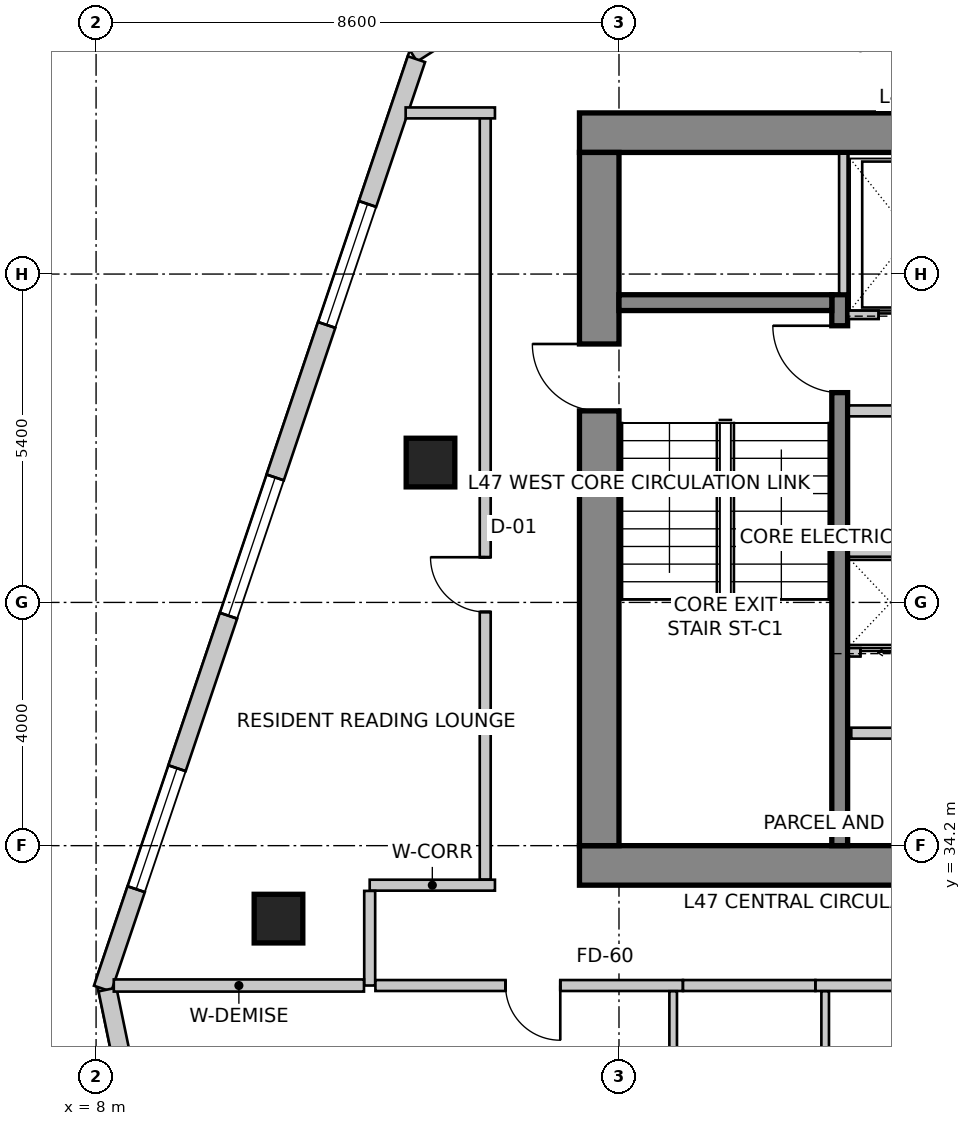
"""IFC4 building model, lengths in metres.
Left out: names, types, materials, properties, quantities, classifications, styles, units other than length and angle.
Written with IfcOpenShell. Run it as: python <this file> out.ifc"""

import sys

from ifc_helpers import new_model, si_unit, direction, frame, frame_2d, origin, origin_2d, place, context, subcontext, project, spatial, rectangle, extrude, source, transform, mapped, element, fill, save


model = new_model("IFC4")
c1 = context("Model", 3, precision=1e-05, world=origin(), true_north=direction((0.0, 1.0)))
c2 = subcontext(c1, "Body", "Model", "MODEL_VIEW")
j1 = project(units=[si_unit("LENGTHUNIT", "METRE"), si_unit("PLANEANGLEUNIT", "RADIAN")], contexts=[c1])
p1 = place(None, origin())
s1 = spatial("IfcSite", under=j1, at=p1, CompositionType="ELEMENT")
p2 = place(p1, origin())
s2 = spatial("IfcBuilding", under=s1, at=p2, CompositionType="ELEMENT")
p3 = place(p2, frame((0.0, 0.0, 190.4)))
s3 = spatial("IfcBuildingStorey", under=s2, at=p3, CompositionType="ELEMENT", Elevation=190.4)
p4 = place(p3, frame((15.95, 45.925, 0.0), z_axis=(0.0, 0.0, 1.0), x_axis=(1.0, 0.0, 0.0)))
e1 = element("IfcWall", 1, at=p4, inside=s3, PredefinedType="SHEAR", context=c2, shape_type="SweptSolid", body=[
    extrude(rectangle(XDim=15.7, YDim=0.65, at=frame_2d((7.85, 0.0))), origin(), (0.0, 0.0, 1.0), 3.5),
])
p5 = place(p3, frame((15.95, 33.875, 0.0), z_axis=(0.0, 0.0, 1.0), x_axis=(1.0, 0.0, 0.0)))
e2 = element("IfcWall", 2, at=p5, inside=s3, PredefinedType="SHEAR", context=c2, shape_type="SweptSolid", body=[
    extrude(rectangle(XDim=15.7, YDim=0.65, at=frame_2d((7.85, 0.0))), origin(), (0.0, 0.0, 1.0), 3.5),
])
m1 = source(origin(), c2, "Body", "SweptSolid", [
    extrude(rectangle(XDim=1.1, YDim=2.15, at=frame_2d((0.55, 1.075))), frame((0.0, 0.335, 0.0), z_axis=(0.0, -1.0, 0.0), x_axis=(1.0, 0.0, 0.0)), (0.0, 0.0, 1.0), 0.67),
])
p6 = place(p5, frame((10.08, 0.0, 0.0)))
e3 = element("IfcOpeningElement", 3, at=p6, cuts=e2, PredefinedType="OPENING", context=c2, shape_type="MappedRepresentation", body=[
    mapped(m1, transform((0.0, 0.0, 0.0), scale=1.0)),
])
p7 = place(p3, frame((16.275, 34.2, 0.0), z_axis=(0.0, 0.0, 1.0), x_axis=(0.0, 1.0, 0.0)))
e4 = element("IfcWall", 4, at=p7, inside=s3, PredefinedType="SHEAR", context=c2, shape_type="SweptSolid", body=[
    extrude(rectangle(XDim=11.4, YDim=0.65, at=frame_2d((5.7, 0.0))), origin(), (0.0, 0.0, 1.0), 3.5),
])
p8 = place(p7, frame((7.15, 0.0, 0.0)))
e5 = element("IfcOpeningElement", 5, at=p8, cuts=e4, PredefinedType="OPENING", context=c2, shape_type="MappedRepresentation", body=[
    mapped(m1, transform((0.0, 0.0, 0.0), scale=1.0)),
])
p9 = place(p3, frame((20.23, 34.2, 0.0), z_axis=(0.0, 0.0, 1.0), x_axis=(0.0, 1.0, 0.0)))
e6 = element("IfcWall", 6, at=p9, inside=s3, PredefinedType="SHEAR", context=c2, shape_type="SweptSolid", body=[
    extrude(rectangle(XDim=9.06, YDim=0.26, at=frame_2d((4.53, 0.0))), origin(), (0.0, 0.0, 1.0), 3.5),
])
m2 = source(origin(), c2, "Body", "SweptSolid", [
    extrude(rectangle(XDim=1.1, YDim=2.15, at=frame_2d((0.55, 1.075))), frame((0.0, 0.14, 0.0), z_axis=(0.0, -1.0, 0.0), x_axis=(1.0, 0.0, 0.0)), (0.0, 0.0, 1.0), 0.28),
])
p10 = place(p9, frame((7.45, 0.0, 0.0)))
e7 = element("IfcOpeningElement", 7, at=p10, cuts=e6, PredefinedType="OPENING", context=c2, shape_type="MappedRepresentation", body=[
    mapped(m2, transform((0.0, 0.0, 0.0), scale=1.0)),
])
p11 = place(p3, frame((16.6, 43.13, 0.0), z_axis=(0.0, 0.0, 1.0), x_axis=(1.0, 0.0, 0.0)))
e8 = element("IfcWall", 8, at=p11, inside=s3, PredefinedType="SHEAR", context=c2, shape_type="SweptSolid", body=[
    extrude(rectangle(XDim=3.5, YDim=0.26, at=frame_2d((1.75, 0.0))), origin(), (0.0, 0.0, 1.0), 3.5),
])
m3 = source(origin(), c2, "Body", "SweptSolid", [
    extrude(rectangle(XDim=0.8, YDim=0.8, at=origin_2d()), origin(), (0.0, 0.0, 1.0), 3.5),
])
for number, where, z_axis, x_axis in (
    (9, (11.0, 33.0, 0.0), (0.0, 0.0, 1.0), (1.0, 0.0, 0.0)),
    (10, (13.5, 40.5, 0.0), (0.0, 0.0, 1.0), (1.0, 0.0, 0.0)),
):
    element("IfcColumn", number, at=place(p3, frame(where, z_axis=z_axis, x_axis=x_axis)), inside=s3, PredefinedType="COLUMN", context=c2, shape_type="MappedRepresentation", body=[
        mapped(m3, transform((0.0, 0.0, 0.0), scale=1.0)),
    ])
p12 = place(p3, frame((21.875, 52.742, 0.0), z_axis=(0.0, 0.0, 1.0), x_axis=(-0.843666375448, -0.536867811419, 0.0)))
e11 = element("IfcWall", 11, at=p12, inside=s3, PredefinedType="SOLIDWALL", context=c2, shape_type="SweptSolid", body=[
    extrude(rectangle(XDim=10.284, YDim=0.3, at=frame_2d((5.142, 0.0))), origin(), (0.0, 0.0, 1.0), 3.25),
])
m4 = source(origin(), c2, "Body", "SweptSolid", [
    extrude(rectangle(XDim=2.4, YDim=2.2, at=frame_2d((1.2, 1.1))), frame((0.0, 0.16, 0.0), z_axis=(0.0, -1.0, 0.0), x_axis=(1.0, 0.0, 0.0)), (0.0, 0.0, 1.0), 0.32),
])
p13 = place(p12, frame((3.307, 0.0, 0.85)))
e12 = element("IfcOpeningElement", 12, at=p13, cuts=e11, PredefinedType="OPENING", context=c2, shape_type="MappedRepresentation", body=[
    mapped(m4, transform((0.0, 0.0, 0.0), scale=1.0)),
])
p14 = place(p3, frame((13.269, 47.134, 0.0), z_axis=(0.0, 0.0, 1.0), x_axis=(-0.319920776449, -0.947444297464, 0.0)))
e13 = element("IfcWall", 13, at=p14, inside=s3, PredefinedType="SOLIDWALL", context=c2, shape_type="SweptSolid", body=[
    extrude(rectangle(XDim=16.133, YDim=0.3, at=frame_2d((8.067, 0.0))), origin(), (0.0, 0.0, 1.0), 3.25),
])
m5 = source(origin(), c2, "Body", "SweptSolid", [
    extrude(rectangle(XDim=2.1, YDim=2.0, at=frame_2d((1.05, 1.0))), frame((0.0, 0.16, 0.0), z_axis=(0.0, -1.0, 0.0), x_axis=(1.0, 0.0, 0.0)), (0.0, 0.0, 1.0), 0.32),
])
p15 = place(p14, frame((2.513, 0.0, 0.85)))
e14 = element("IfcOpeningElement", 14, at=p15, cuts=e13, PredefinedType="OPENING", context=c2, shape_type="MappedRepresentation", body=[
    mapped(m5, transform((0.0, 0.0, 0.0), scale=1.0)),
])
p16 = place(p14, frame((7.26, 0.0, 0.85)))
e15 = element("IfcOpeningElement", 15, at=p16, cuts=e13, PredefinedType="OPENING", context=c2, shape_type="MappedRepresentation", body=[
    mapped(m4, transform((0.0, 0.0, 0.0), scale=1.0)),
])
p17 = place(p14, frame((12.307, 0.0, 0.85)))
e16 = element("IfcOpeningElement", 16, at=p17, cuts=e13, PredefinedType="OPENING", context=c2, shape_type="MappedRepresentation", body=[
    mapped(m5, transform((0.0, 0.0, 0.0), scale=1.0)),
])
p18 = place(p3, frame((8.188, 31.834, 0.0), z_axis=(0.0, 0.0, 1.0), x_axis=(0.202303475707, -0.979322880217, 0.0)))
e17 = element("IfcWall", 17, at=p18, inside=s3, PredefinedType="SOLIDWALL", context=c2, shape_type="SweptSolid", body=[
    extrude(rectangle(XDim=15.766, YDim=0.3, at=frame_2d((7.883, 0.0))), origin(), (0.0, 0.0, 1.0), 3.25),
])
p19 = place(p18, frame((1.404, 0.0, 0.85)))
e18 = element("IfcOpeningElement", 18, at=p19, cuts=e17, PredefinedType="OPENING", context=c2, shape_type="MappedRepresentation", body=[
    mapped(m4, transform((0.0, 0.0, 0.0), scale=1.0)),
])
p20 = place(p18, frame((6.121, 0.0, 0.85)))
e19 = element("IfcOpeningElement", 19, at=p20, cuts=e17, PredefinedType="OPENING", context=c2, shape_type="MappedRepresentation", body=[
    mapped(m5, transform((0.0, 0.0, 0.0), scale=1.0)),
])
p21 = place(p18, frame((11.47, 0.0, 0.85)))
e20 = element("IfcOpeningElement", 20, at=p21, cuts=e17, PredefinedType="OPENING", context=c2, shape_type="MappedRepresentation", body=[
    mapped(m4, transform((0.0, 0.0, 0.0), scale=1.0)),
])
p22 = place(p3, frame((20.37, 42.93, 0.0), z_axis=(0.0, 0.0, 1.0), x_axis=(1.0, 0.0, 0.0)))
e21 = element("IfcWall", 21, at=p22, inside=s3, PredefinedType="SOLIDWALL", context=c2, shape_type="SweptSolid", body=[
    extrude(rectangle(XDim=6.86, YDim=0.14, at=frame_2d((3.43, 0.0))), origin(), (0.0, 0.0, 1.0), 3.25),
])
m6 = source(origin(), c2, "Body", "SweptSolid", [
    extrude(rectangle(XDim=1.1, YDim=2.15, at=frame_2d((0.55, 1.075))), frame((0.0, 0.08, 0.0), z_axis=(0.0, -1.0, 0.0), x_axis=(1.0, 0.0, 0.0)), (0.0, 0.0, 1.0), 0.16),
])
p23 = place(p22, frame((0.5, 0.0, 0.0)))
e22 = element("IfcOpeningElement", 22, at=p23, cuts=e21, PredefinedType="OPENING", context=c2, shape_type="MappedRepresentation", body=[
    mapped(m6, transform((0.0, 0.0, 0.0), scale=1.0)),
])
p24 = place(p22, frame((2.7, 0.0, 0.0)))
e23 = element("IfcOpeningElement", 23, at=p24, cuts=e21, PredefinedType="OPENING", context=c2, shape_type="MappedRepresentation", body=[
    mapped(m6, transform((0.0, 0.0, 0.0), scale=1.0)),
])
p25 = place(p22, frame((5.1, 0.0, 0.0)))
e24 = element("IfcOpeningElement", 24, at=p25, cuts=e21, PredefinedType="OPENING", context=c2, shape_type="MappedRepresentation", body=[
    mapped(m6, transform((0.0, 0.0, 0.0), scale=1.0)),
])
p26 = place(p3, frame((20.29, 43.28, 0.0), z_axis=(0.0, 0.0, 1.0), x_axis=(0.0, 1.0, 0.0)))
e25 = element("IfcWall", 25, at=p26, inside=s3, PredefinedType="SOLIDWALL", context=c2, shape_type="SweptSolid", body=[
    extrude(rectangle(XDim=2.3, YDim=0.14, at=frame_2d((1.15, 0.0))), origin(), (0.0, 0.0, 1.0), 3.25),
])
p27 = place(p3, frame((20.38, 37.38, 0.0), z_axis=(0.0, 0.0, 1.0), x_axis=(1.0, 0.0, 0.0)))
e26 = element("IfcWall", 26, at=p27, inside=s3, PredefinedType="SOLIDWALL", context=c2, shape_type="SweptSolid", body=[
    extrude(rectangle(XDim=5.75, YDim=0.14, at=frame_2d((2.875, 0.0))), origin(), (0.0, 0.0, 1.0), 3.25),
])
m7 = source(origin(), c2, "Body", "SweptSolid", [
    extrude(rectangle(XDim=1.0, YDim=2.15, at=frame_2d((0.5, 1.075))), frame((0.0, 0.08, 0.0), z_axis=(0.0, -1.0, 0.0), x_axis=(1.0, 0.0, 0.0)), (0.0, 0.0, 1.0), 0.16),
])
p28 = place(p27, frame((0.19, 0.0, 0.0)))
e27 = element("IfcOpeningElement", 27, at=p28, cuts=e26, PredefinedType="OPENING", context=c2, shape_type="MappedRepresentation", body=[
    mapped(m7, transform((0.0, 0.0, 0.0), scale=1.0)),
])
p29 = place(p3, frame((20.38, 39.04, 0.0), z_axis=(0.0, 0.0, 1.0), x_axis=(1.0, 0.0, 0.0)))
e28 = element("IfcWall", 28, at=p29, inside=s3, PredefinedType="SOLIDWALL", context=c2, shape_type="SweptSolid", body=[
    extrude(rectangle(XDim=5.75, YDim=0.18, at=frame_2d((2.875, 0.0))), origin(), (0.0, 0.0, 1.0), 3.25),
])
p30 = place(p3, frame((22.96, 41.35, 0.0), z_axis=(0.0, 0.0, 1.0), x_axis=(-1.0, 0.0, 0.0)))
e29 = element("IfcWall", 29, at=p30, inside=s3, PredefinedType="PARTITIONING", context=c2, shape_type="SweptSolid", body=[
    extrude(rectangle(XDim=2.58, YDim=0.18, at=frame_2d((1.29, 0.0))), origin(), (0.0, 0.0, 1.0), 3.25),
])
p31 = place(p3, frame((20.42, 36.05, 0.0), z_axis=(0.0, 0.0, 1.0), x_axis=(1.0, 0.0, 0.0)))
e30 = element("IfcWall", 30, at=p31, inside=s3, PredefinedType="PARTITIONING", context=c2, shape_type="SweptSolid", body=[
    extrude(rectangle(XDim=5.46, YDim=0.18, at=frame_2d((2.73, 0.0))), origin(), (0.0, 0.0, 1.0), 3.25),
])
m8 = source(origin(), c2, "Body", "SweptSolid", [
    extrude(rectangle(XDim=0.9, YDim=2.15, at=frame_2d((0.45, 1.075))), frame((0.0, 0.1, 0.0), z_axis=(0.0, -1.0, 0.0), x_axis=(1.0, 0.0, 0.0)), (0.0, 0.0, 1.0), 0.2),
])
p32 = place(p31, frame((2.219, 0.0, 0.0)))
e31 = element("IfcOpeningElement", 31, at=p32, cuts=e30, PredefinedType="OPENING", context=c2, shape_type="MappedRepresentation", body=[
    mapped(m8, transform((0.0, 0.0, 0.0), scale=1.0)),
])
p33 = place(p3, frame((12.5, 33.55, 0.0), z_axis=(0.0, 0.0, 1.0), x_axis=(1.0, 0.0, 0.0)))
e32 = element("IfcWall", 32, at=p33, inside=s3, PredefinedType="PARTITIONING", context=c2, shape_type="SweptSolid", body=[
    extrude(rectangle(XDim=2.06, YDim=0.18, at=frame_2d((1.03, 0.0))), origin(), (0.0, 0.0, 1.0), 3.25),
])
p34 = place(p3, frame((12.5, 31.9, 0.0), z_axis=(0.0, 0.0, 1.0), x_axis=(0.0, 1.0, 0.0)))
e33 = element("IfcWall", 33, at=p34, inside=s3, PredefinedType="PARTITIONING", context=c2, shape_type="SweptSolid", body=[
    extrude(rectangle(XDim=1.556, YDim=0.18, at=frame_2d((0.778, 0.0))), origin(), (0.0, 0.0, 1.0), 2.934),
])
p35 = place(p3, frame((23.751, 31.9, 0.0), z_axis=(0.0, 0.0, 1.0), x_axis=(-1.0, 0.0, 0.0)))
e34 = element("IfcWall", 34, at=p35, inside=s3, PredefinedType="PARTITIONING", context=c2, shape_type="SweptSolid", body=[
    extrude(rectangle(XDim=3.92, YDim=0.18, at=frame_2d((1.96, 0.0))), origin(), (0.0, 0.0, 1.0), 2.934),
])
p36 = place(p3, frame((17.651, 31.9, 0.0), z_axis=(0.0, 0.0, 1.0), x_axis=(-1.0, 0.0, 0.0)))
e35 = element("IfcWall", 35, at=p36, inside=s3, PredefinedType="PARTITIONING", context=c2, shape_type="SweptSolid", body=[
    extrude(rectangle(XDim=5.057, YDim=0.18, at=frame_2d((2.528, 0.0))), origin(), (0.0, 0.0, 1.0), 2.934),
])
p37 = place(p36, frame((2.017, 0.0, 0.0)))
e36 = element("IfcOpeningElement", 36, at=p37, cuts=e35, PredefinedType="OPENING", context=c2, shape_type="MappedRepresentation", body=[
    mapped(m8, transform((0.0, 0.0, 0.0), scale=1.0)),
])
p38 = place(p3, frame((19.829, 31.9, 0.0), z_axis=(0.0, 0.0, 1.0), x_axis=(-1.0, 0.0, 0.0)))
e37 = element("IfcWall", 37, at=p38, inside=s3, PredefinedType="PARTITIONING", context=c2, shape_type="SweptSolid", body=[
    extrude(rectangle(XDim=2.176, YDim=0.18, at=frame_2d((1.088, 0.0))), origin(), (0.0, 0.0, 1.0), 3.25),
])
p39 = place(p3, frame((14.4, 33.644, 0.0), z_axis=(0.0, 0.0, 1.0), x_axis=(0.0, 1.0, 0.0)))
e38 = element("IfcWall", 38, at=p39, inside=s3, PredefinedType="PARTITIONING", context=c2, shape_type="SweptSolid", body=[
    extrude(rectangle(XDim=12.606, YDim=0.18, at=frame_2d((6.303, 0.0))), origin(), (0.0, 0.0, 1.0), 3.25),
])
p40 = place(p39, frame((4.399, 0.0, 0.0)))
e39 = element("IfcOpeningElement", 39, at=p40, cuts=e38, PredefinedType="OPENING", context=c2, shape_type="MappedRepresentation", body=[
    mapped(m8, transform((0.0, 0.0, 0.0), scale=1.0)),
])
p41 = place(p3, frame((14.56, 46.25, 0.0), z_axis=(0.0, 0.0, 1.0), x_axis=(-1.0, 0.0, 0.0)))
e40 = element("IfcWall", 40, at=p41, inside=s3, PredefinedType="PARTITIONING", context=c2, shape_type="SweptSolid", body=[
    extrude(rectangle(XDim=1.469, YDim=0.18, at=frame_2d((0.734, 0.0))), origin(), (0.0, 0.0, 1.0), 3.25),
])
p42 = place(p3, frame((12.406, 31.9, 0.0), z_axis=(0.0, 0.0, 1.0), x_axis=(-1.0, 0.0, 0.0)))
e41 = element("IfcWall", 41, at=p42, inside=s3, PredefinedType="PARTITIONING", context=c2, shape_type="SweptSolid", body=[
    extrude(rectangle(XDim=4.115, YDim=0.2, at=frame_2d((2.057, 0.0))), origin(), (0.0, 0.0, 1.0), 2.542),
])
p43 = place(p3, frame((19.991, 22.383, 0.0), z_axis=(0.0, 0.0, 1.0), x_axis=(0.0, 1.0, 0.0)))
e42 = element("IfcWall", 42, at=p43, inside=s3, PredefinedType="PARTITIONING", context=c2, shape_type="SweptSolid", body=[
    extrude(rectangle(XDim=9.423, YDim=0.125, at=frame_2d((4.711, 0.0))), origin(), (0.0, 0.0, 1.0), 2.766),
])
m9 = source(origin(), c2, "Body", "SweptSolid", [
    extrude(rectangle(XDim=0.9, YDim=2.15, at=frame_2d((0.45, 1.075))), frame((0.0, 0.073, 0.0), z_axis=(0.0, -1.0, 0.0), x_axis=(1.0, 0.0, 0.0)), (0.0, 0.0, 1.0), 0.145),
])
p44 = place(p43, frame((4.261, 0.0, 0.0)))
e43 = element("IfcOpeningElement", 43, at=p44, cuts=e42, PredefinedType="OPENING", context=c2, shape_type="MappedRepresentation", body=[
    mapped(m9, transform((0.0, 0.0, 0.0), scale=1.0)),
])
p45 = place(p3, frame((17.491, 31.806, 0.0), z_axis=(0.0, 0.0, 1.0), x_axis=(0.0, -1.0, 0.0)))
e44 = element("IfcWall", 44, at=p45, inside=s3, PredefinedType="PARTITIONING", context=c2, shape_type="SweptSolid", body=[
    extrude(rectangle(XDim=9.423, YDim=0.125, at=frame_2d((4.711, 0.0))), origin(), (0.0, 0.0, 1.0), 2.766),
])
m10 = source(origin(), c2, "Body", "SweptSolid", [
    extrude(rectangle(XDim=0.85, YDim=2.15, at=frame_2d((0.425, 1.075))), frame((0.0, 0.073, 0.0), z_axis=(0.0, -1.0, 0.0), x_axis=(1.0, 0.0, 0.0)), (0.0, 0.0, 1.0), 0.145),
])
p46 = place(p45, frame((4.287, 0.0, 0.0)))
e45 = element("IfcOpeningElement", 45, at=p46, cuts=e44, PredefinedType="OPENING", context=c2, shape_type="MappedRepresentation", body=[
    mapped(m10, transform((0.0, 0.0, 0.0), scale=1.0)),
])
m11 = source(origin(), c2, "Body", "SweptSolid", [
    extrude(rectangle(XDim=2.1, YDim=2.0, at=frame_2d((1.05, 1.0))), frame((0.0, -0.015, 0.0), z_axis=(0.0, -1.0, 0.0), x_axis=(1.0, 0.0, 0.0)), (0.0, 0.0, 1.0), 0.06),
])
p47 = place(p15, origin())
e46 = element("IfcWindow", 46, at=p47, inside=s3, PartitioningType="SINGLE_PANEL", PredefinedType="WINDOW", context=c2, shape_type="MappedRepresentation", body=[
    mapped(m11, transform((0.0, 0.0, 0.0), scale=1.0)),
])
fill(e14, e46)
m12 = source(origin(), c2, "Body", "SweptSolid", [
    extrude(rectangle(XDim=2.4, YDim=2.2, at=frame_2d((1.2, 1.1))), frame((0.0, -0.015, 0.0), z_axis=(0.0, -1.0, 0.0), x_axis=(1.0, 0.0, 0.0)), (0.0, 0.0, 1.0), 0.06),
])
p48 = place(p16, origin())
e47 = element("IfcWindow", 47, at=p48, inside=s3, PartitioningType="SINGLE_PANEL", PredefinedType="WINDOW", context=c2, shape_type="MappedRepresentation", body=[
    mapped(m12, transform((0.0, 0.0, 0.0), scale=1.0)),
])
fill(e15, e47)
p49 = place(p17, origin())
e48 = element("IfcWindow", 48, at=p49, inside=s3, PartitioningType="SINGLE_PANEL", PredefinedType="WINDOW", context=c2, shape_type="MappedRepresentation", body=[
    mapped(m11, transform((0.0, 0.0, 0.0), scale=1.0)),
])
fill(e16, e48)
m13 = source(origin(), c2, "Body", "SweptSolid", [
    extrude(rectangle(XDim=1.1, YDim=2.15, at=frame_2d((0.55, 1.075))), frame((0.0, 0.025, 0.0), z_axis=(0.0, -1.0, 0.0), x_axis=(1.0, 0.0, 0.0)), (0.0, 0.0, 1.0), 0.05),
])
p50 = place(p23, origin())
e49 = element("IfcDoor", 49, at=p50, inside=s3, OperationType="SLIDING_TO_LEFT", PredefinedType="DOOR", context=c2, shape_type="MappedRepresentation", body=[
    mapped(m13, transform((0.0, 0.0, 0.0), scale=1.0)),
])
fill(e22, e49)
m14 = source(origin(), c2, "Body", "SweptSolid", [
    extrude(rectangle(XDim=1.0, YDim=2.15, at=frame_2d((0.5, 1.075))), frame((0.0, 0.025, 0.0), z_axis=(0.0, -1.0, 0.0), x_axis=(1.0, 0.0, 0.0)), (0.0, 0.0, 1.0), 0.05),
])
p51 = place(p28, origin())
e50 = element("IfcDoor", 50, at=p51, inside=s3, OperationType="SLIDING_TO_LEFT", PredefinedType="DOOR", context=c2, shape_type="MappedRepresentation", body=[
    mapped(m14, transform((0.0, 0.0, 0.0), scale=1.0)),
])
fill(e27, e50)
m15 = source(origin(), c2, "Body", "SweptSolid", [
    extrude(rectangle(XDim=1.1, YDim=2.15, at=frame_2d((0.55, 1.075))), frame((0.0, 0.025, 0.0), z_axis=(0.0, -1.0, 0.0), x_axis=(1.0, 0.0, 0.0)), (0.0, 0.0, 1.0), 0.05),
])
p52 = place(p10, origin())
e51 = element("IfcDoor", 51, at=p52, inside=s3, OperationType="SINGLE_SWING_RIGHT", PredefinedType="DOOR", context=c2, shape_type="MappedRepresentation", body=[
    mapped(m15, transform((0.0, 0.0, 0.0), scale=1.0)),
])
fill(e7, e51)
p53 = place(p8, origin())
e52 = element("IfcDoor", 52, at=p53, inside=s3, OperationType="SINGLE_SWING_RIGHT", PredefinedType="DOOR", context=c2, shape_type="MappedRepresentation", body=[
    mapped(m15, transform((0.0, 0.0, 0.0), scale=1.0)),
])
fill(e5, e52)
m16 = source(origin(), c2, "Body", "SweptSolid", [
    extrude(rectangle(XDim=0.9, YDim=2.15, at=frame_2d((0.45, 1.075))), frame((0.0, 0.025, 0.0), z_axis=(0.0, -1.0, 0.0), x_axis=(1.0, 0.0, 0.0)), (0.0, 0.0, 1.0), 0.05),
])
p54 = place(p40, origin())
e53 = element("IfcDoor", 53, at=p54, inside=s3, OperationType="SINGLE_SWING_RIGHT", PredefinedType="DOOR", context=c2, shape_type="MappedRepresentation", body=[
    mapped(m16, transform((0.0, 0.0, 0.0), scale=1.0)),
])
fill(e39, e53)
m17 = source(origin(), c2, "Body", "SweptSolid", [
    extrude(rectangle(XDim=0.9, YDim=2.15, at=frame_2d((0.45, 1.075))), frame((0.0, 0.025, 0.0), z_axis=(0.0, -1.0, 0.0), x_axis=(1.0, 0.0, 0.0)), (0.0, 0.0, 1.0), 0.05),
])
p55 = place(p37, origin())
e54 = element("IfcDoor", 54, at=p55, inside=s3, OperationType="SINGLE_SWING_LEFT", PredefinedType="DOOR", context=c2, shape_type="MappedRepresentation", body=[
    mapped(m17, transform((0.0, 0.0, 0.0), scale=1.0)),
])
fill(e36, e54)
save(model, sys.argv[1])
